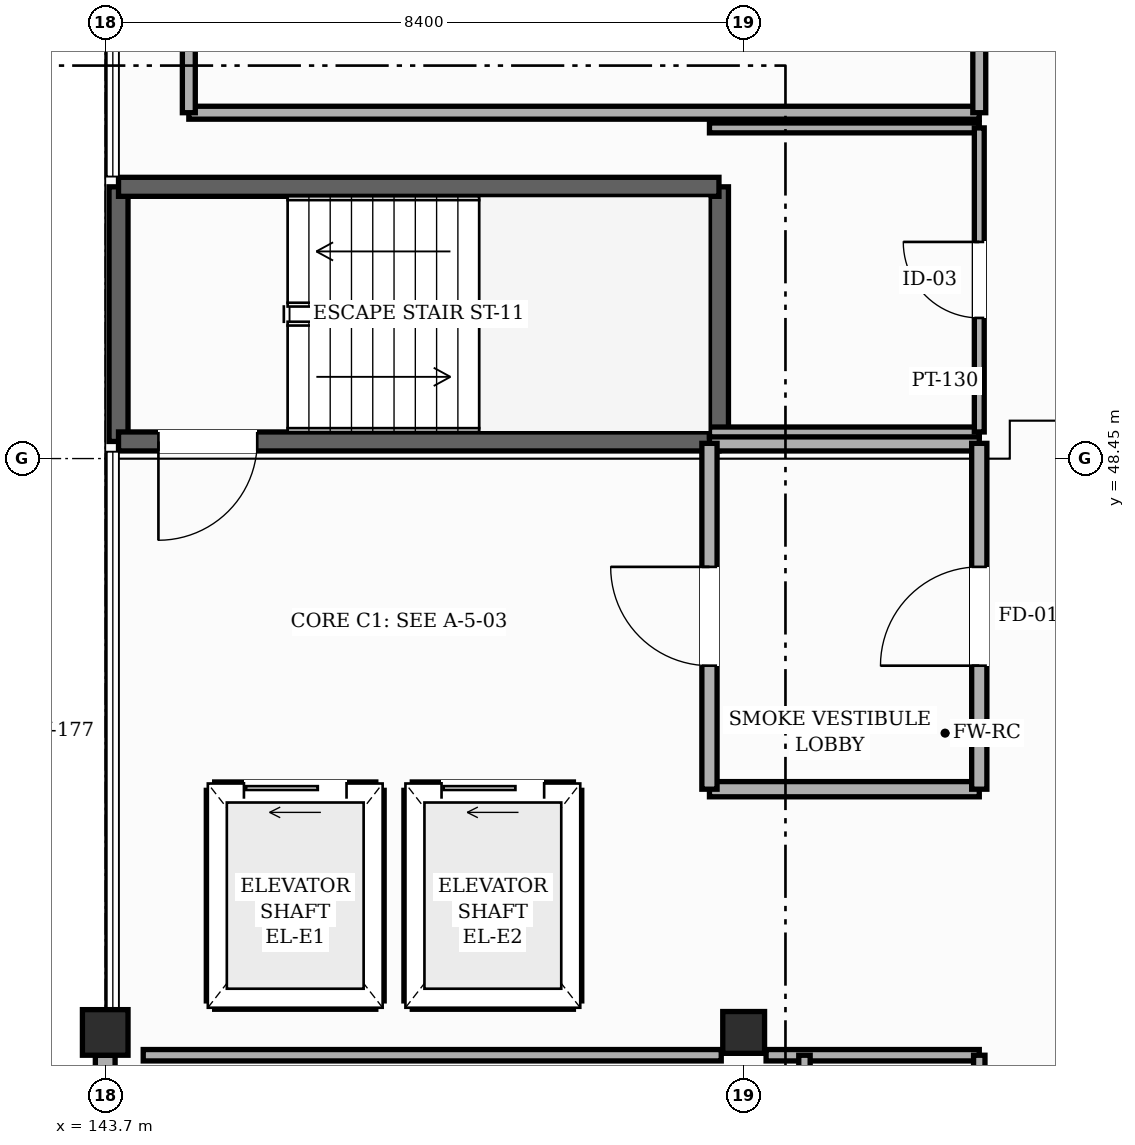
"""IFC4 building model, lengths in metres.
Left out: names, types, materials, properties, quantities, classifications, styles, units other than length and angle.
Written with IfcOpenShell. Run it as: python <this file> out.ifc"""

import sys

from ifc_helpers import new_model, si_unit, direction, frame, frame_2d, origin, origin_2d, place, context, subcontext, project, spatial, rectangle, hollow_rectangle, extrude, element, fill, save


model = new_model("IFC4")
c1 = context("Model", 3, precision=1e-05, world=origin(), true_north=direction((0.0, 1.0)))
c2 = subcontext(c1, "Body", "Model", "MODEL_VIEW")
j1 = project(units=[si_unit("LENGTHUNIT", "METRE"), si_unit("PLANEANGLEUNIT", "RADIAN")], contexts=[c1])
p1 = place(None, origin())
s1 = spatial("IfcSite", under=j1, at=p1, CompositionType="ELEMENT")
p2 = place(p1, origin())
s2 = spatial("IfcBuilding", under=s1, at=p2, CompositionType="ELEMENT")
p3 = place(p2, frame((0.0, 0.0, 31.8)))
s3 = spatial("IfcBuildingStorey", under=s2, at=p3, CompositionType="ELEMENT", Elevation=31.8)
p4 = place(p3, frame((143.7, 40.9, 0.0), z_axis=(0.0, 0.0, 1.0), x_axis=(1.0, 0.0, 0.0)))
e1 = element("IfcColumn", 1, at=p4, inside=s3, PredefinedType="COLUMN", context=c2, shape_type="SweptSolid", body=[
    extrude(hollow_rectangle(XDim=0.6, YDim=0.6, WallThickness=0.025, InnerFilletRadius=0.025, OuterFilletRadius=0.05, at=origin_2d()), origin(), (0.0, 0.0, 1.0), 3.6),
])
p5 = place(p3, frame((152.1, 40.9, 0.0), z_axis=(0.0, 0.0, 1.0), x_axis=(1.0, 0.0, 0.0)))
e2 = element("IfcColumn", 2, at=p5, inside=s3, PredefinedType="COLUMN", context=c2, shape_type="SweptSolid", body=[
    extrude(hollow_rectangle(XDim=0.55, YDim=0.55, WallThickness=0.022, InnerFilletRadius=0.022, OuterFilletRadius=0.044, at=origin_2d()), origin(), (0.0, 0.0, 1.0), 3.6),
])
p6 = place(p3, frame((143.7, 32.3, 0.0), z_axis=(0.0, 0.0, 1.0), x_axis=(0.0, 1.0, 0.0)))
e3 = element("IfcWall", 3, at=p6, inside=s3, PredefinedType="SOLIDWALL", context=c2, shape_type="SweptSolid", body=[
    extrude(rectangle(XDim=8.3, YDim=0.26, at=frame_2d((4.15, 0.0))), origin(), (0.0, 0.0, 1.0), 2.655),
])
p7 = place(p6, frame((0.325, 0.0, 0.85)))
e4 = element("IfcOpeningElement", 4, at=p7, cuts=e3, PredefinedType="OPENING", context=c2, shape_type="SweptSolid", body=[
    extrude(rectangle(XDim=0.85, YDim=1.35, at=frame_2d((0.425, 0.675))), frame((0.0, 0.14, 0.0), z_axis=(0.0, -1.0, 0.0), x_axis=(1.0, 0.0, 0.0)), (0.0, 0.0, 1.0), 0.28),
])
p8 = place(p6, frame((2.225, 0.0, 0.85)))
e5 = element("IfcOpeningElement", 5, at=p8, cuts=e3, PredefinedType="OPENING", context=c2, shape_type="SweptSolid", body=[
    extrude(rectangle(XDim=1.95, YDim=1.35, at=frame_2d((0.975, 0.675))), frame((0.0, 0.14, 0.0), z_axis=(0.0, -1.0, 0.0), x_axis=(1.0, 0.0, 0.0)), (0.0, 0.0, 1.0), 0.28),
])
p9 = place(p6, frame((5.475, 0.0, 0.85)))
e6 = element("IfcOpeningElement", 6, at=p9, cuts=e3, PredefinedType="OPENING", context=c2, shape_type="SweptSolid", body=[
    extrude(rectangle(XDim=2.25, YDim=1.35, at=frame_2d((1.125, 0.675))), frame((0.0, 0.14, 0.0), z_axis=(0.0, -1.0, 0.0), x_axis=(1.0, 0.0, 0.0)), (0.0, 0.0, 1.0), 0.28),
])
for number, where, z_axis, x_axis in (
    (7, (143.875, 48.675, 0.0), (0.0, 0.0, 1.0), (0.0, 1.0, 0.0)),
    (8, (151.775, 52.025, 0.0), (0.0, 0.0, 1.0), (0.0, -1.0, 0.0)),
):
    element("IfcWall", number, at=place(p3, frame(where, z_axis=z_axis, x_axis=x_axis)), inside=s3, PredefinedType="SHEAR", context=c2, shape_type="SweptSolid", body=[
        extrude(rectangle(XDim=3.35, YDim=0.25, at=frame_2d((1.675, 0.0))), origin(), (0.0, 0.0, 1.0), 3.38),
    ])
p10 = place(p3, frame((151.775, 48.675, 0.0), z_axis=(0.0, 0.0, 1.0), x_axis=(-1.0, 0.0, 0.0)))
e9 = element("IfcWall", 9, at=p10, inside=s3, PredefinedType="SHEAR", context=c2, shape_type="SweptSolid", body=[
    extrude(rectangle(XDim=7.9, YDim=0.25, at=frame_2d((3.95, 0.0))), origin(), (0.0, 0.0, 1.0), 3.38),
])
p11 = place(p10, frame((6.075, 0.0, 0.0)))
e10 = element("IfcOpeningElement", 10, at=p11, cuts=e9, PredefinedType="OPENING", context=c2, shape_type="SweptSolid", body=[
    extrude(rectangle(XDim=1.3, YDim=2.2, at=frame_2d((0.65, 1.1))), frame((0.0, 0.135, 0.0), z_axis=(0.0, -1.0, 0.0), x_axis=(1.0, 0.0, 0.0)), (0.0, 0.0, 1.0), 0.27),
])
p12 = place(p3, frame((143.875, 52.025, 0.0), z_axis=(0.0, 0.0, 1.0), x_axis=(1.0, 0.0, 0.0)))
e11 = element("IfcWall", 11, at=p12, inside=s3, PredefinedType="SHEAR", context=c2, shape_type="SweptSolid", body=[
    extrude(rectangle(XDim=7.9, YDim=0.25, at=frame_2d((3.95, 0.0))), origin(), (0.0, 0.0, 1.0), 3.38),
])
p13 = place(p3, frame((145.14, 44.085, 0.0), z_axis=(0.0, 0.0, 1.0), x_axis=(1.0, 0.0, 0.0)))
e12 = element("IfcWall", 12, at=p13, inside=s3, PredefinedType="SHEAR", context=c2, shape_type="SweptSolid", body=[
    extrude(rectangle(XDim=2.12, YDim=0.22, at=frame_2d((1.06, 0.0))), origin(), (0.0, 0.0, 1.0), 3.38),
])
p14 = place(p13, frame((0.385, 0.0, 0.0)))
e13 = element("IfcOpeningElement", 13, at=p14, cuts=e12, PredefinedType="OPENING", context=c2, shape_type="SweptSolid", body=[
    extrude(rectangle(XDim=1.35, YDim=2.3, at=frame_2d((0.675, 1.15))), frame((0.0, 0.12, 0.0), z_axis=(0.0, -1.0, 0.0), x_axis=(1.0, 0.0, 0.0)), (0.0, 0.0, 1.0), 0.24),
])
p15 = place(p3, frame((145.14, 41.315, 0.0), z_axis=(0.0, 0.0, 1.0), x_axis=(1.0, 0.0, 0.0)))
e14 = element("IfcWall", 14, at=p15, inside=s3, PredefinedType="SHEAR", context=c2, shape_type="SweptSolid", body=[
    extrude(rectangle(XDim=2.12, YDim=0.22, at=frame_2d((1.06, 0.0))), origin(), (0.0, 0.0, 1.0), 3.38),
])
for number, where, z_axis, x_axis in (
    (15, (147.26, 41.315, 0.0), (0.0, 0.0, 1.0), (0.0, 1.0, 0.0)),
    (16, (145.14, 41.315, 0.0), (0.0, 0.0, 1.0), (0.0, 1.0, 0.0)),
):
    element("IfcWall", number, at=place(p3, frame(where, z_axis=z_axis, x_axis=x_axis)), inside=s3, PredefinedType="SHEAR", context=c2, shape_type="SweptSolid", body=[
        extrude(rectangle(XDim=2.77, YDim=0.22, at=frame_2d((1.385, 0.0))), origin(), (0.0, 0.0, 1.0), 3.38),
    ])
p16 = place(p3, frame((147.74, 44.085, 0.0), z_axis=(0.0, 0.0, 1.0), x_axis=(1.0, 0.0, 0.0)))
e17 = element("IfcWall", 17, at=p16, inside=s3, PredefinedType="SHEAR", context=c2, shape_type="SweptSolid", body=[
    extrude(rectangle(XDim=2.12, YDim=0.22, at=frame_2d((1.06, 0.0))), origin(), (0.0, 0.0, 1.0), 3.38),
])
p17 = place(p16, frame((0.385, 0.0, 0.0)))
e18 = element("IfcOpeningElement", 18, at=p17, cuts=e17, PredefinedType="OPENING", context=c2, shape_type="SweptSolid", body=[
    extrude(rectangle(XDim=1.35, YDim=2.3, at=frame_2d((0.675, 1.15))), frame((0.0, 0.12, 0.0), z_axis=(0.0, -1.0, 0.0), x_axis=(1.0, 0.0, 0.0)), (0.0, 0.0, 1.0), 0.24),
])
p18 = place(p3, frame((147.74, 41.315, 0.0), z_axis=(0.0, 0.0, 1.0), x_axis=(1.0, 0.0, 0.0)))
e19 = element("IfcWall", 19, at=p18, inside=s3, PredefinedType="SHEAR", context=c2, shape_type="SweptSolid", body=[
    extrude(rectangle(XDim=2.12, YDim=0.22, at=frame_2d((1.06, 0.0))), origin(), (0.0, 0.0, 1.0), 3.38),
])
for number, where, z_axis, x_axis in (
    (20, (149.86, 41.315, 0.0), (0.0, 0.0, 1.0), (0.0, 1.0, 0.0)),
    (21, (147.74, 41.315, 0.0), (0.0, 0.0, 1.0), (0.0, 1.0, 0.0)),
):
    element("IfcWall", number, at=place(p3, frame(where, z_axis=z_axis, x_axis=x_axis)), inside=s3, PredefinedType="SHEAR", context=c2, shape_type="SweptSolid", body=[
        extrude(rectangle(XDim=2.77, YDim=0.22, at=frame_2d((1.385, 0.0))), origin(), (0.0, 0.0, 1.0), 3.38),
    ])
p19 = place(p3, frame((144.2, 40.6, 0.0), z_axis=(0.0, 0.0, 1.0), x_axis=(1.0, 0.0, 0.0)))
e22 = element("IfcWall", 22, at=p19, inside=s3, PredefinedType="PARTITIONING", context=c2, shape_type="SweptSolid", body=[
    extrude(rectangle(XDim=7.605, YDim=0.15, at=frame_2d((3.802, 0.0))), origin(), (0.0, 0.0, 1.0), 2.755),
])
p20 = place(p3, frame((152.395, 40.6, 0.0), z_axis=(0.0, 0.0, 1.0), x_axis=(1.0, 0.0, 0.0)))
e23 = element("IfcWall", 23, at=p20, inside=s3, PredefinedType="PARTITIONING", context=c2, shape_type="SweptSolid", body=[
    extrude(rectangle(XDim=2.805, YDim=0.15, at=frame_2d((1.402, 0.0))), origin(), (0.0, 0.0, 1.0), 2.755),
])
for number, where, z_axis, x_axis in (
    (24, (151.65, 44.1, 0.0), (0.0, 0.0, 1.0), (1.0, 0.0, 0.0)),
    (25, (151.65, 48.65, 0.0), (0.0, 0.0, 1.0), (1.0, 0.0, 0.0)),
):
    element("IfcWall", number, at=place(p3, frame(where, z_axis=z_axis, x_axis=x_axis)), inside=s3, PredefinedType="SOLIDWALL", context=c2, shape_type="SweptSolid", body=[
        extrude(rectangle(XDim=3.55, YDim=0.2, at=frame_2d((1.775, 0.0))), origin(), (0.0, 0.0, 1.0), 3.365),
    ])
for number, where, z_axis, x_axis in (
    (26, (151.65, 48.8, 0.0), (0.0, 0.0, 1.0), (1.0, 0.0, 0.0)),
    (27, (151.65, 52.8, 0.0), (0.0, 0.0, 1.0), (1.0, 0.0, 0.0)),
):
    element("IfcWall", number, at=place(p3, frame(where, z_axis=z_axis, x_axis=x_axis)), inside=s3, PredefinedType="PARTITIONING", context=c2, shape_type="SweptSolid", body=[
        extrude(rectangle(XDim=3.55, YDim=0.13, at=frame_2d((1.775, 0.0))), origin(), (0.0, 0.0, 1.0), 3.365),
    ])
p21 = place(p3, frame((144.8, 53.0, 0.0), z_axis=(0.0, 0.0, 1.0), x_axis=(1.0, 0.0, 0.0)))
e28 = element("IfcWall", 28, at=p21, inside=s3, PredefinedType="PARTITIONING", context=c2, shape_type="SweptSolid", body=[
    extrude(rectangle(XDim=10.4, YDim=0.17, at=frame_2d((5.2, 0.0))), origin(), (0.0, 0.0, 1.0), 3.365),
])
p22 = place(p3, frame((144.8, 53.0, 0.0), z_axis=(0.0, 0.0, 1.0), x_axis=(0.0, 1.0, 0.0)))
e29 = element("IfcWall", 29, at=p22, inside=s3, PredefinedType="PARTITIONING", context=c2, shape_type="SweptSolid", body=[
    extrude(rectangle(XDim=6.45, YDim=0.17, at=frame_2d((3.225, 0.0))), origin(), (0.0, 0.0, 1.0), 3.365),
])
p23 = place(p3, frame((151.65, 44.1, 0.0), z_axis=(0.0, 0.0, 1.0), x_axis=(0.0, 1.0, 0.0)))
e30 = element("IfcWall", 30, at=p23, inside=s3, PredefinedType="SOLIDWALL", context=c2, shape_type="SweptSolid", body=[
    extrude(rectangle(XDim=4.55, YDim=0.2, at=frame_2d((2.275, 0.0))), origin(), (0.0, 0.0, 1.0), 3.365),
])
p24 = place(p23, frame((1.625, 0.0, 0.0)))
e31 = element("IfcOpeningElement", 31, at=p24, cuts=e30, PredefinedType="OPENING", context=c2, shape_type="SweptSolid", body=[
    extrude(rectangle(XDim=1.3, YDim=2.2, at=frame_2d((0.65, 1.1))), frame((0.0, 0.11, 0.0), z_axis=(0.0, -1.0, 0.0), x_axis=(1.0, 0.0, 0.0)), (0.0, 0.0, 1.0), 0.22),
])
p25 = place(p3, frame((152.9, 38.95, 0.0), z_axis=(0.0, 0.0, 1.0), x_axis=(0.0, 1.0, 0.0)))
e32 = element("IfcWall", 32, at=p25, inside=s3, PredefinedType="PARTITIONING", context=c2, shape_type="SweptSolid", body=[
    extrude(rectangle(XDim=1.65, YDim=0.15, at=frame_2d((0.825, 0.0))), origin(), (0.0, 0.0, 1.0), 3.365),
])
p26 = place(p3, frame((155.2, 30.4, 0.0), z_axis=(0.0, 0.0, 1.0), x_axis=(0.0, 1.0, 0.0)))
e33 = element("IfcWall", 33, at=p26, inside=s3, PredefinedType="PARTITIONING", context=c2, shape_type="SweptSolid", body=[
    extrude(rectangle(XDim=10.2, YDim=0.15, at=frame_2d((5.1, 0.0))), origin(), (0.0, 0.0, 1.0), 3.365),
])
p27 = place(p26, frame((0.4, 0.0, 0.0)))
e34 = element("IfcOpeningElement", 34, at=p27, cuts=e33, PredefinedType="OPENING", context=c2, shape_type="SweptSolid", body=[
    extrude(rectangle(XDim=0.95, YDim=2.15, at=frame_2d((0.475, 1.075))), frame((0.0, 0.085, 0.0), z_axis=(0.0, -1.0, 0.0), x_axis=(1.0, 0.0, 0.0)), (0.0, 0.0, 1.0), 0.17),
])
p28 = place(p26, frame((3.8, 0.0, 0.0)))
e35 = element("IfcOpeningElement", 35, at=p28, cuts=e33, PredefinedType="OPENING", context=c2, shape_type="SweptSolid", body=[
    extrude(rectangle(XDim=0.95, YDim=2.15, at=frame_2d((0.475, 1.075))), frame((0.0, 0.085, 0.0), z_axis=(0.0, -1.0, 0.0), x_axis=(1.0, 0.0, 0.0)), (0.0, 0.0, 1.0), 0.17),
])
p29 = place(p26, frame((7.2, 0.0, 0.0)))
e36 = element("IfcOpeningElement", 36, at=p29, cuts=e33, PredefinedType="OPENING", context=c2, shape_type="SweptSolid", body=[
    extrude(rectangle(XDim=0.95, YDim=2.15, at=frame_2d((0.475, 1.075))), frame((0.0, 0.085, 0.0), z_axis=(0.0, -1.0, 0.0), x_axis=(1.0, 0.0, 0.0)), (0.0, 0.0, 1.0), 0.17),
])
p30 = place(p3, frame((155.2, 44.1, 0.0), z_axis=(0.0, 0.0, 1.0), x_axis=(0.0, 1.0, 0.0)))
e37 = element("IfcWall", 37, at=p30, inside=s3, PredefinedType="SOLIDWALL", context=c2, shape_type="SweptSolid", body=[
    extrude(rectangle(XDim=4.55, YDim=0.2, at=frame_2d((2.275, 0.0))), origin(), (0.0, 0.0, 1.0), 3.365),
])
p31 = place(p30, frame((1.625, 0.0, 0.0)))
e38 = element("IfcOpeningElement", 38, at=p31, cuts=e37, PredefinedType="OPENING", context=c2, shape_type="SweptSolid", body=[
    extrude(rectangle(XDim=1.3, YDim=2.2, at=frame_2d((0.65, 1.1))), frame((0.0, 0.11, 0.0), z_axis=(0.0, -1.0, 0.0), x_axis=(1.0, 0.0, 0.0)), (0.0, 0.0, 1.0), 0.22),
])
p32 = place(p3, frame((155.2, 48.8, 0.0), z_axis=(0.0, 0.0, 1.0), x_axis=(0.0, 1.0, 0.0)))
e39 = element("IfcWall", 39, at=p32, inside=s3, PredefinedType="PARTITIONING", context=c2, shape_type="SweptSolid", body=[
    extrude(rectangle(XDim=4.0, YDim=0.13, at=frame_2d((2.0, 0.0))), origin(), (0.0, 0.0, 1.0), 3.365),
])
p33 = place(p32, frame((1.5, 0.0, 0.0)))
e40 = element("IfcOpeningElement", 40, at=p33, cuts=e39, PredefinedType="OPENING", context=c2, shape_type="SweptSolid", body=[
    extrude(rectangle(XDim=1.0, YDim=2.18, at=frame_2d((0.5, 1.09))), frame((0.0, 0.075, 0.0), z_axis=(0.0, -1.0, 0.0), x_axis=(1.0, 0.0, 0.0)), (0.0, 0.0, 1.0), 0.15),
])
p34 = place(p3, frame((155.2, 53.0, 0.0), z_axis=(0.0, 0.0, 1.0), x_axis=(0.0, 1.0, 0.0)))
e41 = element("IfcWall", 41, at=p34, inside=s3, PredefinedType="PARTITIONING", context=c2, shape_type="SweptSolid", body=[
    extrude(rectangle(XDim=6.45, YDim=0.17, at=frame_2d((3.225, 0.0))), origin(), (0.0, 0.0, 1.0), 3.365),
])
p35 = place(p34, frame((2.625, 0.0, 0.0)))
e42 = element("IfcOpeningElement", 42, at=p35, cuts=e41, PredefinedType="OPENING", context=c2, shape_type="SweptSolid", body=[
    extrude(rectangle(XDim=1.2, YDim=2.2, at=frame_2d((0.6, 1.1))), frame((0.0, 0.095, 0.0), z_axis=(0.0, -1.0, 0.0), x_axis=(1.0, 0.0, 0.0)), (0.0, 0.0, 1.0), 0.19),
])
p36 = place(p11, origin())
e43 = element("IfcDoor", 43, at=p36, inside=s3, OperationType="SINGLE_SWING_RIGHT", PredefinedType="DOOR", context=c2, shape_type="SweptSolid", body=[
    extrude(rectangle(XDim=1.3, YDim=2.2, at=frame_2d((0.65, 1.1))), frame((0.0, 0.025, 0.0), z_axis=(0.0, -1.0, 0.0), x_axis=(1.0, 0.0, 0.0)), (0.0, 0.0, 1.0), 0.05),
])
fill(e10, e43)
p37 = place(p14, origin())
e44 = element("IfcDoor", 44, at=p37, inside=s3, OperationType="SLIDING_TO_LEFT", PredefinedType="DOOR", context=c2, shape_type="SweptSolid", body=[
    extrude(rectangle(XDim=1.35, YDim=2.3, at=frame_2d((0.675, 1.15))), frame((0.0, 0.025, 0.0), z_axis=(0.0, -1.0, 0.0), x_axis=(1.0, 0.0, 0.0)), (0.0, 0.0, 1.0), 0.05),
])
fill(e13, e44)
p38 = place(p17, origin())
e45 = element("IfcDoor", 45, at=p38, inside=s3, OperationType="SLIDING_TO_LEFT", PredefinedType="DOOR", context=c2, shape_type="SweptSolid", body=[
    extrude(rectangle(XDim=1.35, YDim=2.3, at=frame_2d((0.675, 1.15))), frame((0.0, 0.025, 0.0), z_axis=(0.0, -1.0, 0.0), x_axis=(1.0, 0.0, 0.0)), (0.0, 0.0, 1.0), 0.05),
])
fill(e18, e45)
p39 = place(p24, origin())
e46 = element("IfcDoor", 46, at=p39, inside=s3, OperationType="SINGLE_SWING_RIGHT", PredefinedType="DOOR", context=c2, shape_type="SweptSolid", body=[
    extrude(rectangle(XDim=1.3, YDim=2.2, at=frame_2d((0.65, 1.1))), frame((0.0, 0.025, 0.0), z_axis=(0.0, -1.0, 0.0), x_axis=(1.0, 0.0, 0.0)), (0.0, 0.0, 1.0), 0.05),
])
fill(e31, e46)
p40 = place(p31, origin())
e47 = element("IfcDoor", 47, at=p40, inside=s3, OperationType="SINGLE_SWING_LEFT", PredefinedType="DOOR", context=c2, shape_type="SweptSolid", body=[
    extrude(rectangle(XDim=1.3, YDim=2.2, at=frame_2d((0.65, 1.1))), frame((0.0, 0.025, 0.0), z_axis=(0.0, -1.0, 0.0), x_axis=(1.0, 0.0, 0.0)), (0.0, 0.0, 1.0), 0.05),
])
fill(e38, e47)
p41 = place(p33, origin())
e48 = element("IfcDoor", 48, at=p41, inside=s3, OperationType="SINGLE_SWING_RIGHT", PredefinedType="DOOR", context=c2, shape_type="SweptSolid", body=[
    extrude(rectangle(XDim=1.0, YDim=2.18, at=frame_2d((0.5, 1.09))), frame((0.0, 0.025, 0.0), z_axis=(0.0, -1.0, 0.0), x_axis=(1.0, 0.0, 0.0)), (0.0, 0.0, 1.0), 0.05),
])
fill(e40, e48)
save(model, sys.argv[1])
